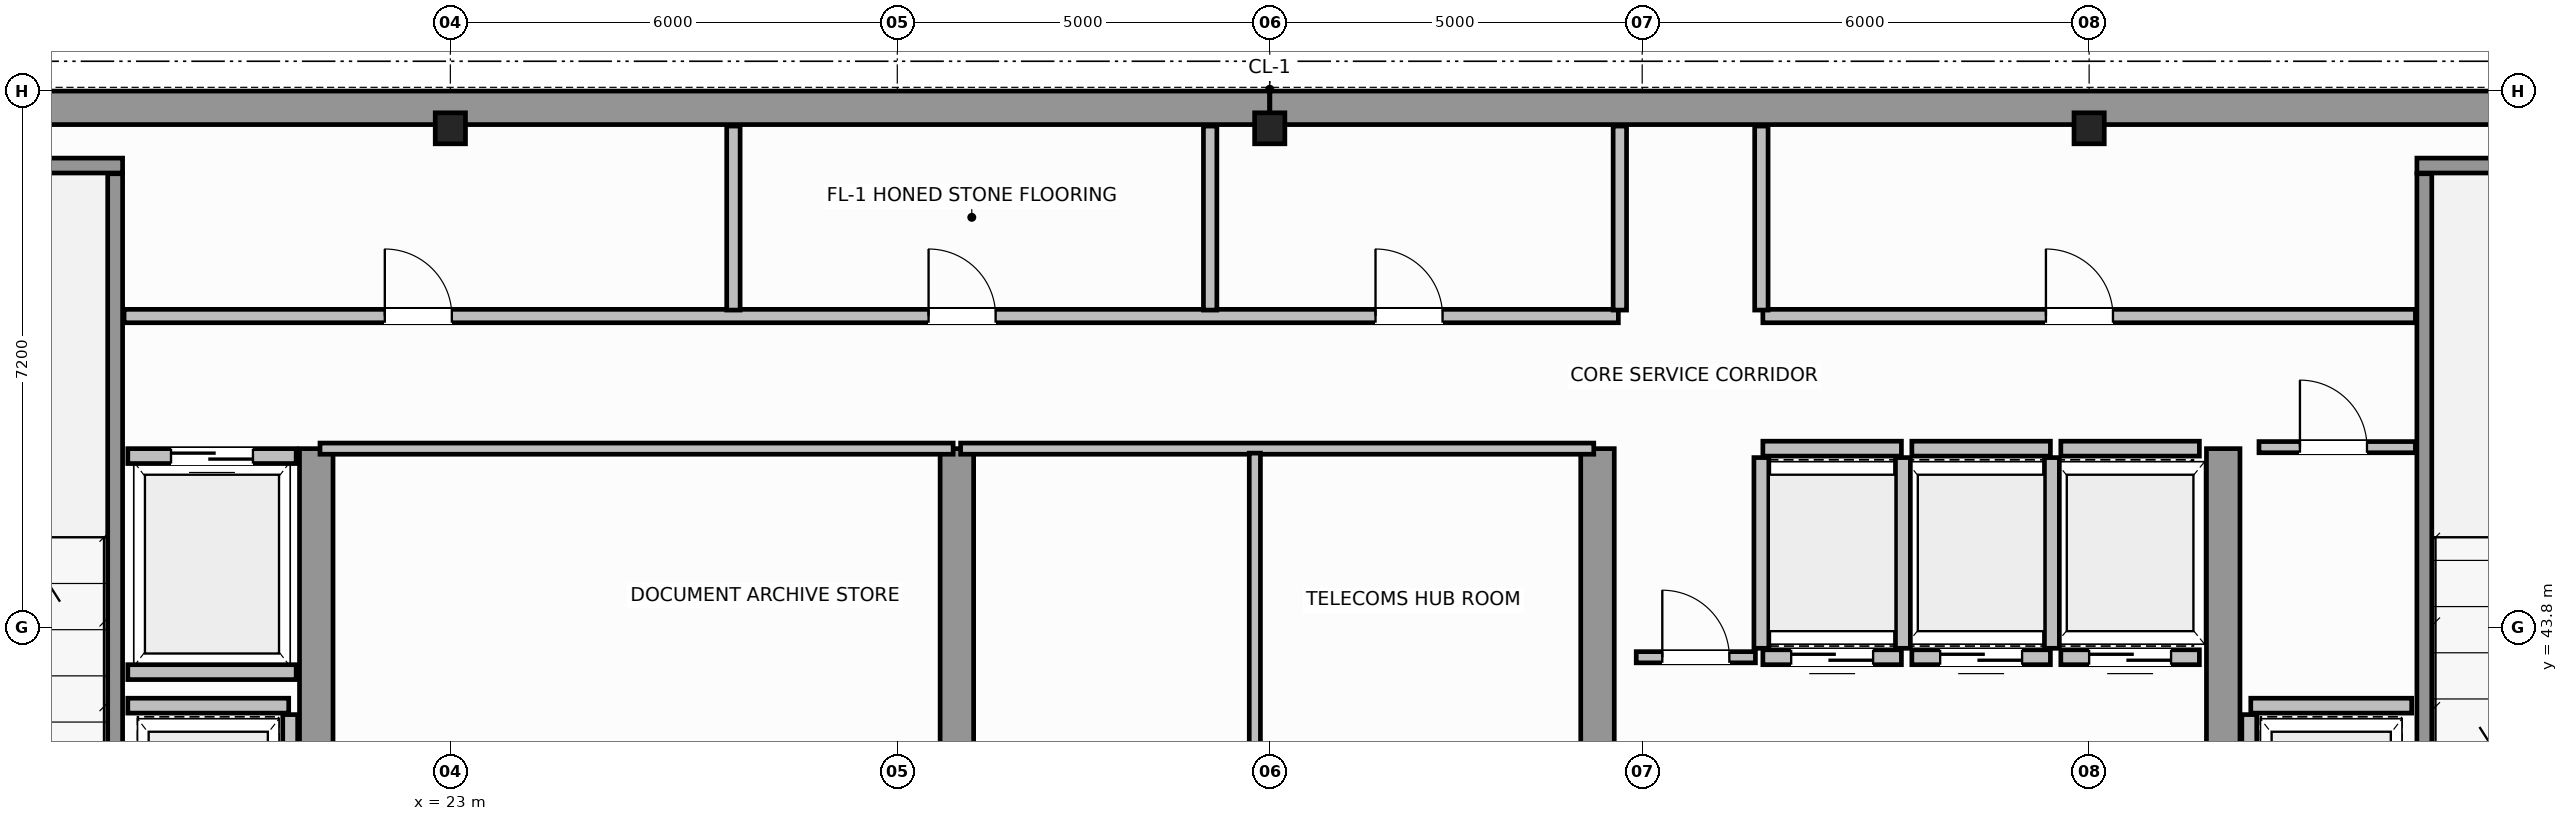
"""IFC4 building model, lengths in metres.
Left out: names, types, materials, properties, quantities, classifications, styles, units other than length and angle.
Written with IfcOpenShell. Run it as: python <this file> out.ifc"""

import sys

from ifc_helpers import new_model, si_unit, direction, frame, frame_2d, origin, origin_2d, place, context, subcontext, project, spatial, rectangle, i_section, extrude, source, transform, mapped, element, fill, save


model = new_model("IFC4")
c1 = context("Model", 3, precision=1e-05, world=origin(), true_north=direction((0.0, 1.0)))
c2 = subcontext(c1, "Body", "Model", "MODEL_VIEW")
j1 = project(units=[si_unit("LENGTHUNIT", "METRE"), si_unit("PLANEANGLEUNIT", "RADIAN")], contexts=[c1])
p1 = place(None, origin())
s1 = spatial("IfcSite", under=j1, at=p1, CompositionType="ELEMENT")
p2 = place(p1, origin())
s2 = spatial("IfcBuilding", under=s1, at=p2, CompositionType="ELEMENT")
p3 = place(p2, frame((0.0, 0.0, 287.8)))
s3 = spatial("IfcBuildingStorey", under=s2, at=p3, CompositionType="ELEMENT", Elevation=287.8)
m1 = source(origin(), c2, "Body", "SweptSolid", [
    extrude(i_section(OverallWidth=0.406, OverallDepth=0.416, WebThickness=0.03, FlangeThickness=0.042, FilletRadius=0.015, at=origin_2d()), origin(), (0.0, 0.0, 1.0), 3.8),
])
for number, where, z_axis, x_axis in (
    (1, (23.0, 50.5, 0.0), (0.0, 0.0, 1.0), (1.0, 0.0, 0.0)),
    (2, (34.0, 50.5, 0.0), (0.0, 0.0, 1.0), (1.0, 0.0, 0.0)),
    (3, (45.0, 50.5, 0.0), (0.0, 0.0, 1.0), (1.0, 0.0, 0.0)),
):
    element("IfcColumn", number, at=place(p3, frame(where, z_axis=z_axis, x_axis=x_axis)), inside=s3, PredefinedType="COLUMN", context=c2, shape_type="MappedRepresentation", body=[
        mapped(m1, transform((0.0, 0.0, 0.0), scale=1.0)),
    ])
for number, where, z_axis, x_axis in (
    (4, (14.229, 50.775, 0.0), (0.0, 0.0, 1.0), (1.0, 0.0, 0.0)),
    (5, (34.002, 50.775, 0.0), (0.0, 0.0, 1.0), (1.0, 0.0, 0.0)),
):
    element("IfcWall", number, at=place(p3, frame(where, z_axis=z_axis, x_axis=x_axis)), inside=s3, PredefinedType="SHEAR", context=c2, shape_type="SweptSolid", body=[
        extrude(rectangle(XDim=19.769, YDim=0.45, at=frame_2d((9.885, 0.0))), origin(), (0.0, 0.0, 1.0), 3.8),
    ])
for number, where, z_axis, x_axis in (
    (6, (21.2, 36.745, 0.0), (0.0, 0.0, 1.0), (0.0, 1.0, 0.0)),
    (7, (29.8, 36.745, 0.0), (0.0, 0.0, 1.0), (0.0, 1.0, 0.0)),
    (8, (38.4, 36.745, 0.0), (0.0, 0.0, 1.0), (0.0, 1.0, 0.0)),
    (9, (46.8, 36.745, 0.0), (0.0, 0.0, 1.0), (0.0, 1.0, 0.0)),
):
    element("IfcWall", number, at=place(p3, frame(where, z_axis=z_axis, x_axis=x_axis)), inside=s3, PredefinedType="SHEAR", context=c2, shape_type="SweptSolid", body=[
        extrude(rectangle(XDim=9.455, YDim=0.45, at=frame_2d((4.728, 0.0))), origin(), (0.0, 0.0, 1.0), 3.8),
    ])
p4 = place(p3, frame((14.225, 50.0, 0.0), z_axis=(0.0, 0.0, 1.0), x_axis=(1.0, 0.0, 0.0)))
e10 = element("IfcWall", 10, at=p4, inside=s3, PredefinedType="SOLIDWALL", context=c2, shape_type="SweptSolid", body=[
    extrude(rectangle(XDim=4.375, YDim=0.2, at=frame_2d((2.188, 0.0))), origin(), (0.0, 0.0, 1.0), 3.8),
])
p5 = place(p3, frame((18.5, 39.96, 0.0), z_axis=(0.0, 0.0, 1.0), x_axis=(0.0, 1.0, 0.0)))
e11 = element("IfcWall", 11, at=p5, inside=s3, PredefinedType="SOLIDWALL", context=c2, shape_type="SweptSolid", body=[
    extrude(rectangle(XDim=9.93, YDim=0.2, at=frame_2d((4.965, 0.0))), origin(), (0.0, 0.0, 1.0), 3.8),
])
p6 = place(p3, frame((49.4, 50.0, 0.0), z_axis=(0.0, 0.0, 1.0), x_axis=(1.0, 0.0, 0.0)))
e12 = element("IfcWall", 12, at=p6, inside=s3, PredefinedType="SOLIDWALL", context=c2, shape_type="SweptSolid", body=[
    extrude(rectangle(XDim=4.375, YDim=0.2, at=frame_2d((2.188, 0.0))), origin(), (0.0, 0.0, 1.0), 3.8),
])
p7 = place(p3, frame((49.5, 39.96, 0.0), z_axis=(0.0, 0.0, 1.0), x_axis=(0.0, 1.0, 0.0)))
e13 = element("IfcWall", 13, at=p7, inside=s3, PredefinedType="SOLIDWALL", context=c2, shape_type="SweptSolid", body=[
    extrude(rectangle(XDim=9.93, YDim=0.2, at=frame_2d((4.965, 0.0))), origin(), (0.0, 0.0, 1.0), 3.8),
])
p8 = place(p3, frame((40.62, 43.4, 0.0), z_axis=(0.0, 0.0, 1.0), x_axis=(1.0, 0.0, 0.0)))
e14 = element("IfcWall", 14, at=p8, inside=s3, PredefinedType="SOLIDWALL", context=c2, shape_type="SweptSolid", body=[
    extrude(rectangle(XDim=1.86, YDim=0.2, at=frame_2d((0.93, 0.0))), origin(), (0.0, 0.0, 1.0), 3.58),
])
p9 = place(p8, frame((0.38, 0.0, 0.0)))
e15 = element("IfcOpeningElement", 15, at=p9, cuts=e14, PredefinedType="OPENING", context=c2, shape_type="SweptSolid", body=[
    extrude(rectangle(XDim=1.1, YDim=2.15, at=frame_2d((0.55, 1.075))), frame((0.0, 0.11, 0.0), z_axis=(0.0, -1.0, 0.0), x_axis=(1.0, 0.0, 0.0)), (0.0, 0.0, 1.0), 0.22),
])
p10 = place(p3, frame((40.62, 46.2, 0.0), z_axis=(0.0, 0.0, 1.0), x_axis=(1.0, 0.0, 0.0)))
e16 = element("IfcWall", 16, at=p10, inside=s3, PredefinedType="SOLIDWALL", context=c2, shape_type="SweptSolid", body=[
    extrude(rectangle(XDim=1.86, YDim=0.2, at=frame_2d((0.93, 0.0))), origin(), (0.0, 0.0, 1.0), 3.58),
])
for number, where, z_axis, x_axis in (
    (17, (40.6, 43.52, 0.0), (0.0, 0.0, 1.0), (0.0, 1.0, 0.0)),
    (18, (42.5, 43.52, 0.0), (0.0, 0.0, 1.0), (0.0, 1.0, 0.0)),
):
    element("IfcWall", number, at=place(p3, frame(where, z_axis=z_axis, x_axis=x_axis)), inside=s3, PredefinedType="SOLIDWALL", context=c2, shape_type="SweptSolid", body=[
        extrude(rectangle(XDim=2.56, YDim=0.2, at=frame_2d((1.28, 0.0))), origin(), (0.0, 0.0, 1.0), 3.58),
    ])
p11 = place(p3, frame((42.62, 43.4, 0.0), z_axis=(0.0, 0.0, 1.0), x_axis=(1.0, 0.0, 0.0)))
e19 = element("IfcWall", 19, at=p11, inside=s3, PredefinedType="SOLIDWALL", context=c2, shape_type="SweptSolid", body=[
    extrude(rectangle(XDim=1.86, YDim=0.2, at=frame_2d((0.93, 0.0))), origin(), (0.0, 0.0, 1.0), 3.58),
])
p12 = place(p11, frame((0.38, 0.0, 0.0)))
e20 = element("IfcOpeningElement", 20, at=p12, cuts=e19, PredefinedType="OPENING", context=c2, shape_type="SweptSolid", body=[
    extrude(rectangle(XDim=1.1, YDim=2.15, at=frame_2d((0.55, 1.075))), frame((0.0, 0.11, 0.0), z_axis=(0.0, -1.0, 0.0), x_axis=(1.0, 0.0, 0.0)), (0.0, 0.0, 1.0), 0.22),
])
p13 = place(p3, frame((42.62, 46.2, 0.0), z_axis=(0.0, 0.0, 1.0), x_axis=(1.0, 0.0, 0.0)))
e21 = element("IfcWall", 21, at=p13, inside=s3, PredefinedType="SOLIDWALL", context=c2, shape_type="SweptSolid", body=[
    extrude(rectangle(XDim=1.86, YDim=0.2, at=frame_2d((0.93, 0.0))), origin(), (0.0, 0.0, 1.0), 3.58),
])
p14 = place(p3, frame((44.5, 43.52, 0.0), z_axis=(0.0, 0.0, 1.0), x_axis=(0.0, 1.0, 0.0)))
e22 = element("IfcWall", 22, at=p14, inside=s3, PredefinedType="SOLIDWALL", context=c2, shape_type="SweptSolid", body=[
    extrude(rectangle(XDim=2.56, YDim=0.2, at=frame_2d((1.28, 0.0))), origin(), (0.0, 0.0, 1.0), 3.58),
])
p15 = place(p3, frame((44.62, 43.4, 0.0), z_axis=(0.0, 0.0, 1.0), x_axis=(1.0, 0.0, 0.0)))
e23 = element("IfcWall", 23, at=p15, inside=s3, PredefinedType="SOLIDWALL", context=c2, shape_type="SweptSolid", body=[
    extrude(rectangle(XDim=1.86, YDim=0.2, at=frame_2d((0.93, 0.0))), origin(), (0.0, 0.0, 1.0), 3.58),
])
p16 = place(p15, frame((0.38, 0.0, 0.0)))
e24 = element("IfcOpeningElement", 24, at=p16, cuts=e23, PredefinedType="OPENING", context=c2, shape_type="SweptSolid", body=[
    extrude(rectangle(XDim=1.1, YDim=2.15, at=frame_2d((0.55, 1.075))), frame((0.0, 0.11, 0.0), z_axis=(0.0, -1.0, 0.0), x_axis=(1.0, 0.0, 0.0)), (0.0, 0.0, 1.0), 0.22),
])
p17 = place(p3, frame((44.62, 46.2, 0.0), z_axis=(0.0, 0.0, 1.0), x_axis=(1.0, 0.0, 0.0)))
e25 = element("IfcWall", 25, at=p17, inside=s3, PredefinedType="SOLIDWALL", context=c2, shape_type="SweptSolid", body=[
    extrude(rectangle(XDim=1.86, YDim=0.2, at=frame_2d((0.93, 0.0))), origin(), (0.0, 0.0, 1.0), 3.58),
])
p18 = place(p3, frame((18.67, 46.1, 0.0), z_axis=(0.0, 0.0, 1.0), x_axis=(1.0, 0.0, 0.0)))
e26 = element("IfcWall", 26, at=p18, inside=s3, PredefinedType="SOLIDWALL", context=c2, shape_type="SweptSolid", body=[
    extrude(rectangle(XDim=2.26, YDim=0.2, at=frame_2d((1.13, 0.0))), origin(), (0.0, 0.0, 1.0), 3.58),
])
p19 = place(p18, frame((0.58, 0.0, 0.0)))
e27 = element("IfcOpeningElement", 27, at=p19, cuts=e26, PredefinedType="OPENING", context=c2, shape_type="SweptSolid", body=[
    extrude(rectangle(XDim=1.1, YDim=2.15, at=frame_2d((0.55, 1.075))), frame((0.0, 0.11, 0.0), z_axis=(0.0, -1.0, 0.0), x_axis=(1.0, 0.0, 0.0)), (0.0, 0.0, 1.0), 0.22),
])
p20 = place(p3, frame((18.67, 43.2, 0.0), z_axis=(0.0, 0.0, 1.0), x_axis=(1.0, 0.0, 0.0)))
e28 = element("IfcWall", 28, at=p20, inside=s3, PredefinedType="SOLIDWALL", context=c2, shape_type="SweptSolid", body=[
    extrude(rectangle(XDim=2.26, YDim=0.2, at=frame_2d((1.13, 0.0))), origin(), (0.0, 0.0, 1.0), 3.58),
])
p21 = place(p3, frame((18.67, 42.75, 0.0), z_axis=(0.0, 0.0, 1.0), x_axis=(1.0, 0.0, 0.0)))
e29 = element("IfcWall", 29, at=p21, inside=s3, PredefinedType="SOLIDWALL", context=c2, shape_type="SweptSolid", body=[
    extrude(rectangle(XDim=2.16, YDim=0.2, at=frame_2d((1.08, 0.0))), origin(), (0.0, 0.0, 1.0), 3.58),
])
p22 = place(p3, frame((20.85, 40.07, 0.0), z_axis=(0.0, 0.0, 1.0), x_axis=(0.0, 1.0, 0.0)))
e30 = element("IfcWall", 30, at=p22, inside=s3, PredefinedType="SOLIDWALL", context=c2, shape_type="SweptSolid", body=[
    extrude(rectangle(XDim=2.56, YDim=0.2, at=frame_2d((1.28, 0.0))), origin(), (0.0, 0.0, 1.0), 3.58),
])
p23 = place(p3, frame((47.17, 42.75, 0.0), z_axis=(0.0, 0.0, 1.0), x_axis=(1.0, 0.0, 0.0)))
e31 = element("IfcWall", 31, at=p23, inside=s3, PredefinedType="SOLIDWALL", context=c2, shape_type="SweptSolid", body=[
    extrude(rectangle(XDim=2.16, YDim=0.2, at=frame_2d((1.08, 0.0))), origin(), (0.0, 0.0, 1.0), 3.58),
])
p24 = place(p3, frame((47.15, 40.07, 0.0), z_axis=(0.0, 0.0, 1.0), x_axis=(0.0, 1.0, 0.0)))
e32 = element("IfcWall", 32, at=p24, inside=s3, PredefinedType="SOLIDWALL", context=c2, shape_type="SweptSolid", body=[
    extrude(rectangle(XDim=2.56, YDim=0.2, at=frame_2d((1.28, 0.0))), origin(), (0.0, 0.0, 1.0), 3.58),
])
for number, where, z_axis, x_axis in (
    (33, (21.25, 46.2, 0.0), (0.0, 0.0, 1.0), (1.0, 0.0, 0.0)),
    (34, (29.85, 46.2, 0.0), (0.0, 0.0, 1.0), (1.0, 0.0, 0.0)),
):
    element("IfcWall", number, at=place(p3, frame(where, z_axis=z_axis, x_axis=x_axis)), inside=s3, PredefinedType="PARTITIONING", context=c2, shape_type="SweptSolid", body=[
        extrude(rectangle(XDim=8.5, YDim=0.15, at=frame_2d((4.25, 0.0))), origin(), (0.0, 0.0, 1.0), 3.58),
    ])
p25 = place(p3, frame((33.8, 36.56, 0.0), z_axis=(0.0, 0.0, 1.0), x_axis=(0.0, 1.0, 0.0)))
e35 = element("IfcWall", 35, at=p25, inside=s3, PredefinedType="PARTITIONING", context=c2, shape_type="SweptSolid", body=[
    extrude(rectangle(XDim=9.58, YDim=0.15, at=frame_2d((4.79, 0.0))), origin(), (0.0, 0.0, 1.0), 3.58),
])
p26 = place(p25, frame((4.2, 0.0, 0.0)))
e36 = element("IfcOpeningElement", 36, at=p26, cuts=e35, PredefinedType="OPENING", context=c2, shape_type="SweptSolid", body=[
    extrude(rectangle(XDim=0.9, YDim=2.1, at=frame_2d((0.45, 1.05))), frame((0.0, 0.085, 0.0), z_axis=(0.0, -1.0, 0.0), x_axis=(1.0, 0.0, 0.0)), (0.0, 0.0, 1.0), 0.17),
])
p27 = place(p3, frame((47.28, 46.22, 0.0), z_axis=(0.0, 0.0, 1.0), x_axis=(1.0, 0.0, 0.0)))
e37 = element("IfcWall", 37, at=p27, inside=s3, PredefinedType="PARTITIONING", context=c2, shape_type="SweptSolid", body=[
    extrude(rectangle(XDim=2.1, YDim=0.15, at=frame_2d((1.05, 0.0))), origin(), (0.0, 0.0, 1.0), 3.58),
])
p28 = place(p27, frame((0.55, 0.0, 0.0)))
e38 = element("IfcOpeningElement", 38, at=p28, cuts=e37, PredefinedType="OPENING", context=c2, shape_type="SweptSolid", body=[
    extrude(rectangle(XDim=0.9, YDim=2.1, at=frame_2d((0.45, 1.05))), frame((0.0, 0.085, 0.0), z_axis=(0.0, -1.0, 0.0), x_axis=(1.0, 0.0, 0.0)), (0.0, 0.0, 1.0), 0.17),
])
p29 = place(p3, frame((38.92, 43.4, 0.0), z_axis=(0.0, 0.0, 1.0), x_axis=(1.0, 0.0, 0.0)))
e39 = element("IfcWall", 39, at=p29, inside=s3, PredefinedType="PARTITIONING", context=c2, shape_type="SweptSolid", body=[
    extrude(rectangle(XDim=1.6, YDim=0.15, at=frame_2d((0.8, 0.0))), origin(), (0.0, 0.0, 1.0), 3.58),
])
p30 = place(p29, frame((0.35, 0.0, 0.0)))
e40 = element("IfcOpeningElement", 40, at=p30, cuts=e39, PredefinedType="OPENING", context=c2, shape_type="SweptSolid", body=[
    extrude(rectangle(XDim=0.9, YDim=2.1, at=frame_2d((0.45, 1.05))), frame((0.0, 0.085, 0.0), z_axis=(0.0, -1.0, 0.0), x_axis=(1.0, 0.0, 0.0)), (0.0, 0.0, 1.0), 0.17),
])
p31 = place(p3, frame((18.62, 47.98, 0.0), z_axis=(0.0, 0.0, 1.0), x_axis=(1.0, 0.0, 0.0)))
e41 = element("IfcWall", 41, at=p31, inside=s3, PredefinedType="PLUMBINGWALL", context=c2, shape_type="SweptSolid", body=[
    extrude(rectangle(XDim=20.06, YDim=0.18, at=frame_2d((10.03, 0.0))), origin(), (0.0, 0.0, 1.0), 3.58),
])
p32 = place(p31, frame((3.5, 0.0, 0.0)))
e42 = element("IfcOpeningElement", 42, at=p32, cuts=e41, PredefinedType="OPENING", context=c2, shape_type="SweptSolid", body=[
    extrude(rectangle(XDim=0.9, YDim=2.15, at=frame_2d((0.45, 1.075))), frame((0.0, 0.1, 0.0), z_axis=(0.0, -1.0, 0.0), x_axis=(1.0, 0.0, 0.0)), (0.0, 0.0, 1.0), 0.2),
])
p33 = place(p31, frame((10.8, 0.0, 0.0)))
e43 = element("IfcOpeningElement", 43, at=p33, cuts=e41, PredefinedType="OPENING", context=c2, shape_type="SweptSolid", body=[
    extrude(rectangle(XDim=0.9, YDim=2.15, at=frame_2d((0.45, 1.075))), frame((0.0, 0.1, 0.0), z_axis=(0.0, -1.0, 0.0), x_axis=(1.0, 0.0, 0.0)), (0.0, 0.0, 1.0), 0.2),
])
p34 = place(p31, frame((16.8, 0.0, 0.0)))
e44 = element("IfcOpeningElement", 44, at=p34, cuts=e41, PredefinedType="OPENING", context=c2, shape_type="SweptSolid", body=[
    extrude(rectangle(XDim=0.9, YDim=2.15, at=frame_2d((0.45, 1.075))), frame((0.0, 0.1, 0.0), z_axis=(0.0, -1.0, 0.0), x_axis=(1.0, 0.0, 0.0)), (0.0, 0.0, 1.0), 0.2),
])
p35 = place(p3, frame((40.62, 47.98, 0.0), z_axis=(0.0, 0.0, 1.0), x_axis=(1.0, 0.0, 0.0)))
e45 = element("IfcWall", 45, at=p35, inside=s3, PredefinedType="PLUMBINGWALL", context=c2, shape_type="SweptSolid", body=[
    extrude(rectangle(XDim=8.76, YDim=0.18, at=frame_2d((4.38, 0.0))), origin(), (0.0, 0.0, 1.0), 3.58),
])
p36 = place(p35, frame((3.8, 0.0, 0.0)))
e46 = element("IfcOpeningElement", 46, at=p36, cuts=e45, PredefinedType="OPENING", context=c2, shape_type="SweptSolid", body=[
    extrude(rectangle(XDim=0.9, YDim=2.15, at=frame_2d((0.45, 1.075))), frame((0.0, 0.1, 0.0), z_axis=(0.0, -1.0, 0.0), x_axis=(1.0, 0.0, 0.0)), (0.0, 0.0, 1.0), 0.2),
])
for number, where, z_axis, x_axis in (
    (47, (26.8, 48.06, 0.0), (0.0, 0.0, 1.0), (0.0, 1.0, 0.0)),
    (48, (33.2, 48.06, 0.0), (0.0, 0.0, 1.0), (0.0, 1.0, 0.0)),
    (49, (38.7, 48.06, 0.0), (0.0, 0.0, 1.0), (0.0, 1.0, 0.0)),
    (50, (40.6, 48.06, 0.0), (0.0, 0.0, 1.0), (0.0, 1.0, 0.0)),
):
    element("IfcWall", number, at=place(p3, frame(where, z_axis=z_axis, x_axis=x_axis)), inside=s3, PredefinedType="PLUMBINGWALL", context=c2, shape_type="SweptSolid", body=[
        extrude(rectangle(XDim=2.47, YDim=0.18, at=frame_2d((1.235, 0.0))), origin(), (0.0, 0.0, 1.0), 3.58),
    ])
m2 = source(origin(), c2, "Body", "SweptSolid", [
    extrude(rectangle(XDim=1.1, YDim=2.15, at=frame_2d((0.55, 1.075))), frame((0.0, 0.025, 0.0), z_axis=(0.0, -1.0, 0.0), x_axis=(1.0, 0.0, 0.0)), (0.0, 0.0, 1.0), 0.05),
])
p37 = place(p9, origin())
e51 = element("IfcDoor", 51, at=p37, inside=s3, OperationType="DOUBLE_DOOR_SLIDING", PredefinedType="DOOR", context=c2, shape_type="MappedRepresentation", body=[
    mapped(m2, transform((0.0, 0.0, 0.0), scale=1.0)),
])
fill(e15, e51)
p38 = place(p12, origin())
e52 = element("IfcDoor", 52, at=p38, inside=s3, OperationType="DOUBLE_DOOR_SLIDING", PredefinedType="DOOR", context=c2, shape_type="MappedRepresentation", body=[
    mapped(m2, transform((0.0, 0.0, 0.0), scale=1.0)),
])
fill(e20, e52)
p39 = place(p16, origin())
e53 = element("IfcDoor", 53, at=p39, inside=s3, OperationType="DOUBLE_DOOR_SLIDING", PredefinedType="DOOR", context=c2, shape_type="MappedRepresentation", body=[
    mapped(m2, transform((0.0, 0.0, 0.0), scale=1.0)),
])
fill(e24, e53)
p40 = place(p19, origin())
e54 = element("IfcDoor", 54, at=p40, inside=s3, OperationType="DOUBLE_DOOR_SLIDING", PredefinedType="DOOR", context=c2, shape_type="MappedRepresentation", body=[
    mapped(m2, transform((0.0, 0.0, 0.0), scale=1.0)),
])
fill(e27, e54)
m3 = source(origin(), c2, "Body", "SweptSolid", [
    extrude(rectangle(XDim=0.9, YDim=2.1, at=frame_2d((0.45, 1.05))), frame((0.0, 0.025, 0.0), z_axis=(0.0, -1.0, 0.0), x_axis=(1.0, 0.0, 0.0)), (0.0, 0.0, 1.0), 0.05),
])
p41 = place(p28, origin())
e55 = element("IfcDoor", 55, at=p41, inside=s3, OperationType="SINGLE_SWING_RIGHT", PredefinedType="DOOR", context=c2, shape_type="MappedRepresentation", body=[
    mapped(m3, transform((0.0, 0.0, 0.0), scale=1.0)),
])
fill(e38, e55)
p42 = place(p30, origin())
e56 = element("IfcDoor", 56, at=p42, inside=s3, OperationType="SINGLE_SWING_LEFT", PredefinedType="DOOR", context=c2, shape_type="MappedRepresentation", body=[
    mapped(m3, transform((0.0, 0.0, 0.0), scale=1.0)),
])
fill(e40, e56)
m4 = source(origin(), c2, "Body", "SweptSolid", [
    extrude(rectangle(XDim=0.9, YDim=2.15, at=frame_2d((0.45, 1.075))), frame((0.0, 0.025, 0.0), z_axis=(0.0, -1.0, 0.0), x_axis=(1.0, 0.0, 0.0)), (0.0, 0.0, 1.0), 0.05),
])
p43 = place(p32, origin())
e57 = element("IfcDoor", 57, at=p43, inside=s3, OperationType="SINGLE_SWING_LEFT", PredefinedType="DOOR", context=c2, shape_type="MappedRepresentation", body=[
    mapped(m4, transform((0.0, 0.0, 0.0), scale=1.0)),
])
fill(e42, e57)
p44 = place(p33, origin())
e58 = element("IfcDoor", 58, at=p44, inside=s3, OperationType="SINGLE_SWING_RIGHT", PredefinedType="DOOR", context=c2, shape_type="MappedRepresentation", body=[
    mapped(m4, transform((0.0, 0.0, 0.0), scale=1.0)),
])
fill(e43, e58)
p45 = place(p34, origin())
e59 = element("IfcDoor", 59, at=p45, inside=s3, OperationType="SINGLE_SWING_LEFT", PredefinedType="DOOR", context=c2, shape_type="MappedRepresentation", body=[
    mapped(m4, transform((0.0, 0.0, 0.0), scale=1.0)),
])
fill(e44, e59)
p46 = place(p36, origin())
e60 = element("IfcDoor", 60, at=p46, inside=s3, OperationType="SINGLE_SWING_RIGHT", PredefinedType="DOOR", context=c2, shape_type="MappedRepresentation", body=[
    mapped(m4, transform((0.0, 0.0, 0.0), scale=1.0)),
])
fill(e46, e60)
save(model, sys.argv[1])
